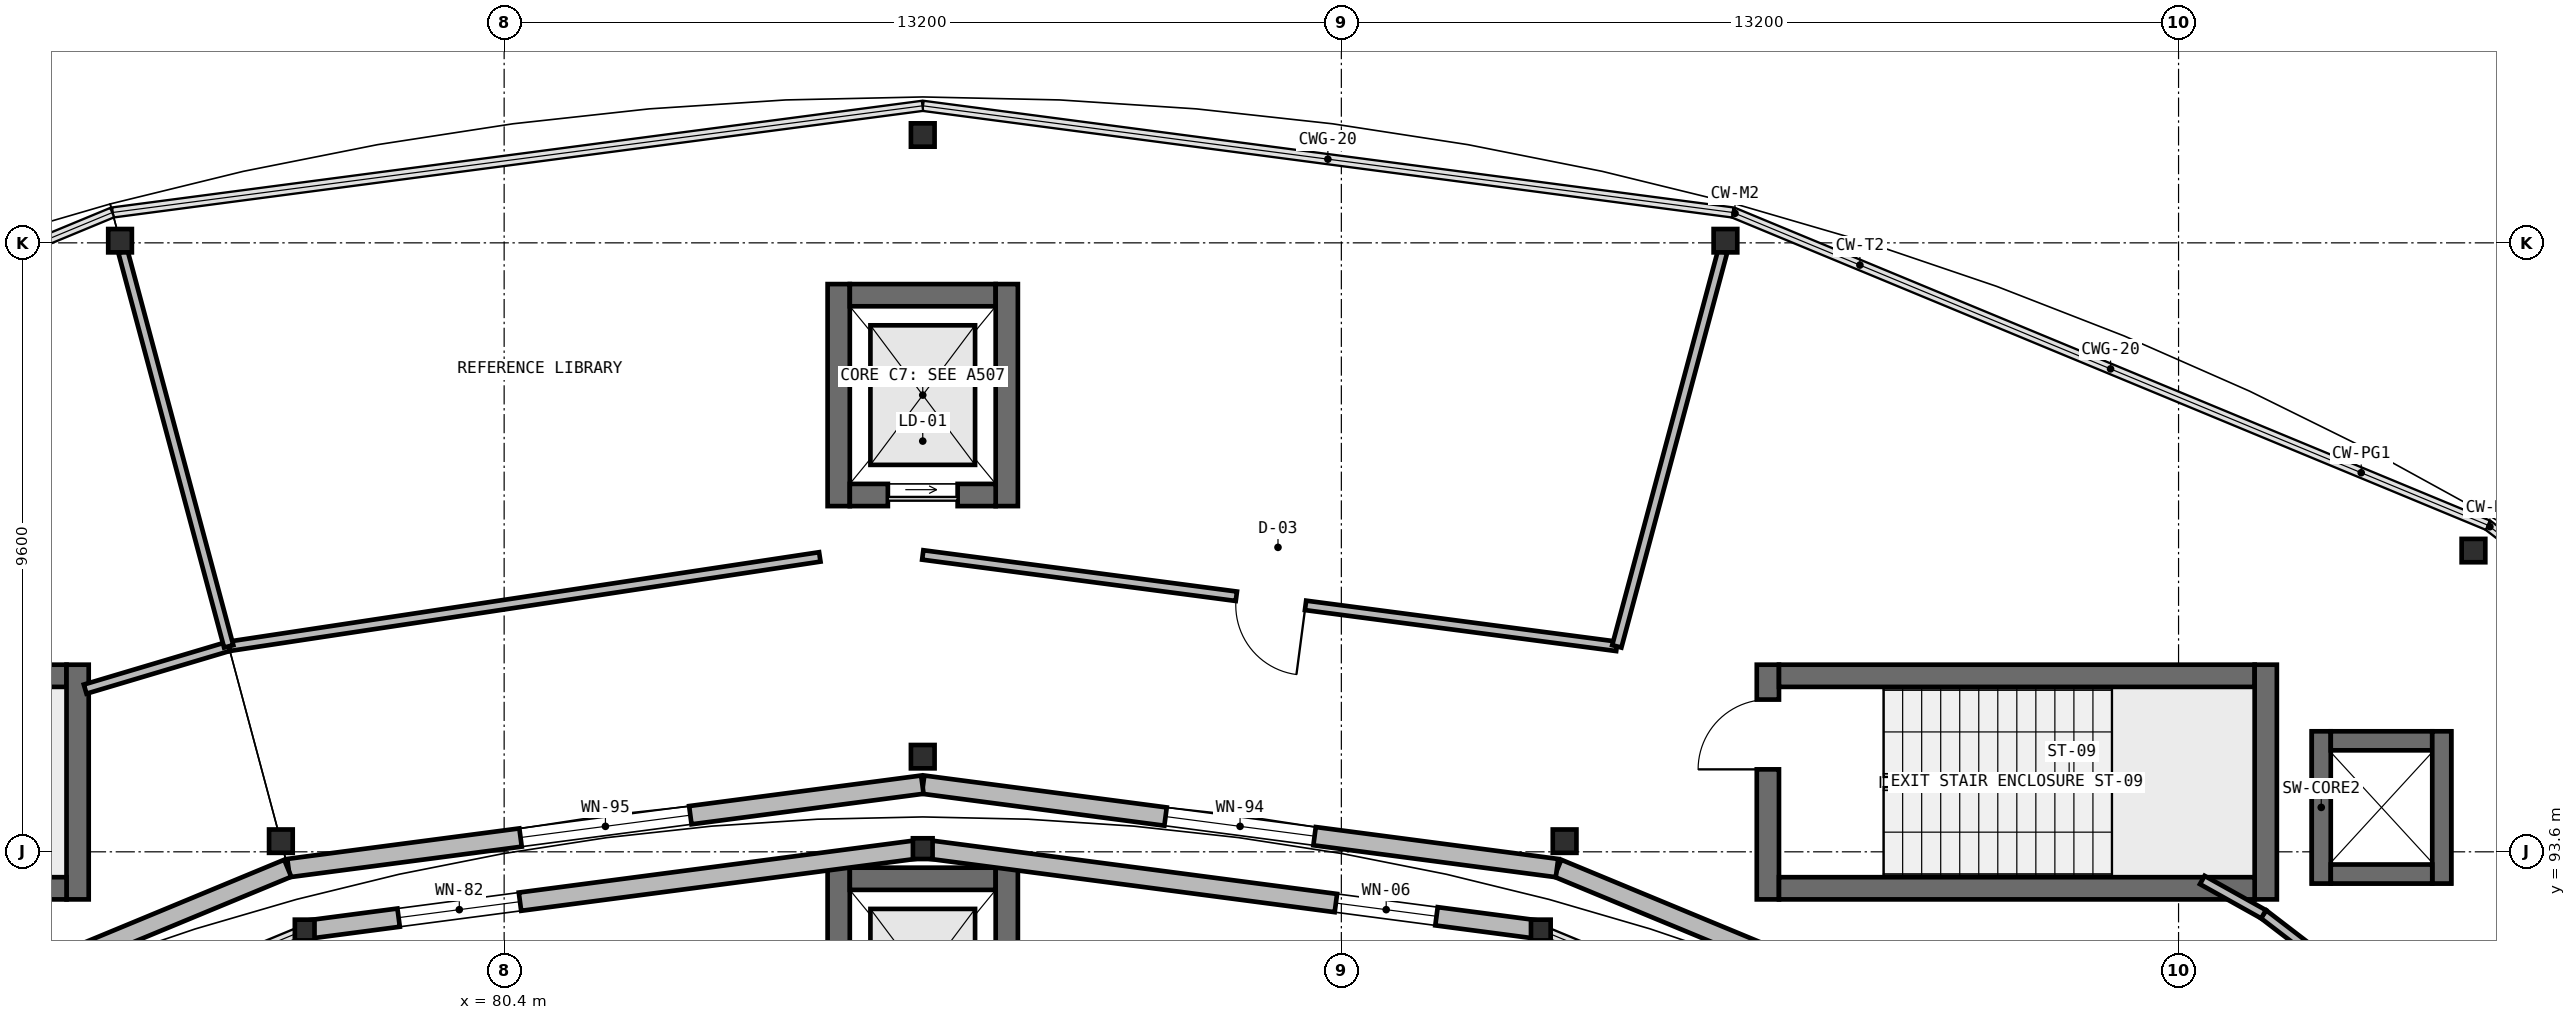
"""IFC4 building model, lengths in metres.
Left out: names, types, materials, properties, quantities, classifications, styles, units other than length and angle.
Written with IfcOpenShell. Run it as: python <this file> out.ifc"""

import sys

from ifc_helpers import new_model, si_unit, direction, frame, frame_2d, origin, origin_2d, place, context, subcontext, project, spatial, rectangle, i_section, extrude, element, fill, save


model = new_model("IFC4")
c1 = context("Model", 3, precision=1e-05, world=origin(), true_north=direction((0.0, 1.0)))
c2 = subcontext(c1, "Body", "Model", "MODEL_VIEW")
j1 = project(units=[si_unit("LENGTHUNIT", "METRE"), si_unit("PLANEANGLEUNIT", "RADIAN")], contexts=[c1])
p1 = place(None, origin())
s1 = spatial("IfcSite", under=j1, at=p1, CompositionType="ELEMENT")
p2 = place(p1, origin())
s2 = spatial("IfcBuilding", under=s1, at=p2, CompositionType="ELEMENT")
p3 = place(p2, frame((0.0, 0.0, 5.25)))
s3 = spatial("IfcBuildingStorey", under=s2, at=p3, CompositionType="ELEMENT", Elevation=5.25)
p4 = place(p3, frame((100.325, 92.85, 0.0), z_axis=(0.0, 0.0, 1.0), x_axis=(0.0, 1.0, 0.0)))
e1 = element("IfcWall", 1, at=p4, inside=s3, PredefinedType="SHEAR", context=c2, shape_type="SweptSolid", body=[
    extrude(rectangle(XDim=3.7, YDim=0.35, at=frame_2d((1.85, 0.0))), origin(), (0.0, 0.0, 1.0), 4.55),
])
p5 = place(p4, frame((2.05, 0.0, 0.0)))
e2 = element("IfcOpeningElement", 2, at=p5, cuts=e1, PredefinedType="OPENING", context=c2, shape_type="SweptSolid", body=[
    extrude(rectangle(XDim=1.1, YDim=2.15, at=frame_2d((0.55, 1.075))), frame((0.0, 0.185, 0.0), z_axis=(0.0, -1.0, 0.0), x_axis=(1.0, 0.0, 0.0)), (0.0, 0.0, 1.0), 0.37),
])
p6 = place(p3, frame((100.5, 96.375, 0.0), z_axis=(0.0, 0.0, 1.0), x_axis=(1.0, 0.0, 0.0)))
e3 = element("IfcWall", 3, at=p6, inside=s3, PredefinedType="SHEAR", context=c2, shape_type="SweptSolid", body=[
    extrude(rectangle(XDim=7.5, YDim=0.35, at=frame_2d((3.75, 0.0))), origin(), (0.0, 0.0, 1.0), 4.55),
])
p7 = place(p3, frame((108.175, 96.55, 0.0), z_axis=(0.0, 0.0, 1.0), x_axis=(0.0, -1.0, 0.0)))
e4 = element("IfcWall", 4, at=p7, inside=s3, PredefinedType="SHEAR", context=c2, shape_type="SweptSolid", body=[
    extrude(rectangle(XDim=3.7, YDim=0.35, at=frame_2d((1.85, 0.0))), origin(), (0.0, 0.0, 1.0), 4.55),
])
for number, where, z_axis, x_axis in (
    (5, (108.0, 93.025, 0.0), (0.0, 0.0, 1.0), (-1.0, 0.0, 0.0)),
    (6, (66.0, 96.375, 0.0), (0.0, 0.0, 1.0), (1.0, 0.0, 0.0)),
):
    element("IfcWall", number, at=place(p3, frame(where, z_axis=z_axis, x_axis=x_axis)), inside=s3, PredefinedType="SHEAR", context=c2, shape_type="SweptSolid", body=[
        extrude(rectangle(XDim=7.5, YDim=0.35, at=frame_2d((3.75, 0.0))), origin(), (0.0, 0.0, 1.0), 4.55),
    ])
p8 = place(p3, frame((73.675, 96.55, 0.0), z_axis=(0.0, 0.0, 1.0), x_axis=(0.0, -1.0, 0.0)))
e7 = element("IfcWall", 7, at=p8, inside=s3, PredefinedType="SHEAR", context=c2, shape_type="SweptSolid", body=[
    extrude(rectangle(XDim=3.7, YDim=0.35, at=frame_2d((1.85, 0.0))), origin(), (0.0, 0.0, 1.0), 4.55),
])
p9 = place(p3, frame((73.5, 93.025, 0.0), z_axis=(0.0, 0.0, 1.0), x_axis=(-1.0, 0.0, 0.0)))
e8 = element("IfcWall", 8, at=p9, inside=s3, PredefinedType="SHEAR", context=c2, shape_type="SweptSolid", body=[
    extrude(rectangle(XDim=7.5, YDim=0.35, at=frame_2d((3.75, 0.0))), origin(), (0.0, 0.0, 1.0), 4.55),
])
p10 = place(p9, frame((6.1, 0.0, 0.0)))
e9 = element("IfcOpeningElement", 9, at=p10, cuts=e8, PredefinedType="OPENING", context=c2, shape_type="SweptSolid", body=[
    extrude(rectangle(XDim=1.1, YDim=2.15, at=frame_2d((0.55, 1.075))), frame((0.0, 0.185, 0.0), z_axis=(0.0, -1.0, 0.0), x_axis=(1.0, 0.0, 0.0)), (0.0, 0.0, 1.0), 0.37),
])
p11 = place(p3, frame((85.675, 89.85, 0.0), z_axis=(0.0, 0.0, 1.0), x_axis=(0.0, 1.0, 0.0)))
e10 = element("IfcWall", 10, at=p11, inside=s3, PredefinedType="SHEAR", context=c2, shape_type="SweptSolid", body=[
    extrude(rectangle(XDim=3.5, YDim=0.35, at=frame_2d((1.75, 0.0))), origin(), (0.0, 0.0, 1.0), 4.55),
])
p12 = place(p3, frame((85.85, 93.175, 0.0), z_axis=(0.0, 0.0, 1.0), x_axis=(1.0, 0.0, 0.0)))
e11 = element("IfcWall", 11, at=p12, inside=s3, PredefinedType="SHEAR", context=c2, shape_type="SweptSolid", body=[
    extrude(rectangle(XDim=2.3, YDim=0.35, at=frame_2d((1.15, 0.0))), origin(), (0.0, 0.0, 1.0), 4.55),
])
for number, where, z_axis, x_axis in (
    (12, (88.325, 93.35, 0.0), (0.0, 0.0, 1.0), (0.0, -1.0, 0.0)),
    (13, (85.675, 99.05, 0.0), (0.0, 0.0, 1.0), (0.0, 1.0, 0.0)),
):
    element("IfcWall", number, at=place(p3, frame(where, z_axis=z_axis, x_axis=x_axis)), inside=s3, PredefinedType="SHEAR", context=c2, shape_type="SweptSolid", body=[
        extrude(rectangle(XDim=3.5, YDim=0.35, at=frame_2d((1.75, 0.0))), origin(), (0.0, 0.0, 1.0), 4.55),
    ])
p13 = place(p3, frame((85.85, 102.375, 0.0), z_axis=(0.0, 0.0, 1.0), x_axis=(1.0, 0.0, 0.0)))
e14 = element("IfcWall", 14, at=p13, inside=s3, PredefinedType="SHEAR", context=c2, shape_type="SweptSolid", body=[
    extrude(rectangle(XDim=2.3, YDim=0.35, at=frame_2d((1.15, 0.0))), origin(), (0.0, 0.0, 1.0), 4.55),
])
p14 = place(p3, frame((88.325, 102.55, 0.0), z_axis=(0.0, 0.0, 1.0), x_axis=(0.0, -1.0, 0.0)))
e15 = element("IfcWall", 15, at=p14, inside=s3, PredefinedType="SHEAR", context=c2, shape_type="SweptSolid", body=[
    extrude(rectangle(XDim=3.5, YDim=0.35, at=frame_2d((1.75, 0.0))), origin(), (0.0, 0.0, 1.0), 4.55),
])
p15 = place(p3, frame((88.15, 99.225, 0.0), z_axis=(0.0, 0.0, 1.0), x_axis=(-1.0, 0.0, 0.0)))
e16 = element("IfcWall", 16, at=p15, inside=s3, PredefinedType="SHEAR", context=c2, shape_type="SweptSolid", body=[
    extrude(rectangle(XDim=2.3, YDim=0.35, at=frame_2d((1.15, 0.0))), origin(), (0.0, 0.0, 1.0), 4.55),
])
p16 = place(p15, frame((0.6, 0.0, 0.0)))
e17 = element("IfcOpeningElement", 17, at=p16, cuts=e16, PredefinedType="OPENING", context=c2, shape_type="SweptSolid", body=[
    extrude(rectangle(XDim=1.1, YDim=2.15, at=frame_2d((0.55, 1.075))), frame((0.0, 0.185, 0.0), z_axis=(0.0, -1.0, 0.0), x_axis=(1.0, 0.0, 0.0)), (0.0, 0.0, 1.0), 0.37),
])
for number, where, z_axis, x_axis in (
    (18, (111.45, 98.349, 0.0), (0.0, 0.0, 1.0), (1.0, 0.0, 0.0)),
    (19, (97.12, 93.768, 0.0), (0.0, 0.0, 1.0), (1.0, 0.0, 0.0)),
    (20, (99.656, 103.234, 0.0), (0.0, 0.0, 1.0), (1.0, 0.0, 0.0)),
    (21, (87.0, 95.1, 0.0), (0.0, 0.0, 1.0), (1.0, 0.0, 0.0)),
    (22, (87.0, 104.9, 0.0), (0.0, 0.0, 1.0), (1.0, 0.0, 0.0)),
    (23, (76.88, 93.768, 0.0), (0.0, 0.0, 1.0), (1.0, 0.0, 0.0)),
    (24, (74.344, 103.234, 0.0), (0.0, 0.0, 1.0), (1.0, 0.0, 0.0)),
):
    element("IfcColumn", number, at=place(p3, frame(where, z_axis=z_axis, x_axis=x_axis)), inside=s3, PredefinedType="COLUMN", context=c2, shape_type="SweptSolid", body=[
        extrude(i_section(OverallWidth=0.373, OverallDepth=0.368, WebThickness=0.017, FlangeThickness=0.027, at=origin_2d()), origin(), (0.0, 0.0, 1.0), 4.55),
    ])
for number, where, z_axis, x_axis in (
    (25, (96.745, 92.367, 0.0), (0.0, 0.0, 1.0), (1.0, 0.0, 0.0)),
    (26, (87.0, 93.65, 0.0), (0.0, 0.0, 1.0), (1.0, 0.0, 0.0)),
    (27, (77.255, 92.367, 0.0), (0.0, 0.0, 1.0), (1.0, 0.0, 0.0)),
):
    element("IfcColumn", number, at=place(p3, frame(where, z_axis=z_axis, x_axis=x_axis)), inside=s3, PredefinedType="COLUMN", context=c2, shape_type="SweptSolid", body=[
        extrude(i_section(OverallWidth=0.31, OverallDepth=0.327, WebThickness=0.016, FlangeThickness=0.025, at=origin_2d()), origin(), (0.0, 0.0, 1.0), 4.55),
    ])
p17 = place(p3, frame((109.05, 93.1, 0.0), z_axis=(0.0, 0.0, 1.0), x_axis=(0.0, 1.0, 0.0)))
e28 = element("IfcWall", 28, at=p17, inside=s3, PredefinedType="SHEAR", context=c2, shape_type="SweptSolid", body=[
    extrude(rectangle(XDim=2.4, YDim=0.3, at=frame_2d((1.2, 0.0))), origin(), (0.0, 0.0, 1.0), 4.37),
])
p18 = place(p3, frame((109.2, 95.35, 0.0), z_axis=(0.0, 0.0, 1.0), x_axis=(1.0, 0.0, 0.0)))
e29 = element("IfcWall", 29, at=p18, inside=s3, PredefinedType="SHEAR", context=c2, shape_type="SweptSolid", body=[
    extrude(rectangle(XDim=1.6, YDim=0.3, at=frame_2d((0.8, 0.0))), origin(), (0.0, 0.0, 1.0), 4.37),
])
p19 = place(p3, frame((110.95, 95.5, 0.0), z_axis=(0.0, 0.0, 1.0), x_axis=(0.0, -1.0, 0.0)))
e30 = element("IfcWall", 30, at=p19, inside=s3, PredefinedType="SHEAR", context=c2, shape_type="SweptSolid", body=[
    extrude(rectangle(XDim=2.4, YDim=0.3, at=frame_2d((1.2, 0.0))), origin(), (0.0, 0.0, 1.0), 4.37),
])
p20 = place(p3, frame((110.8, 93.25, 0.0), z_axis=(0.0, 0.0, 1.0), x_axis=(-1.0, 0.0, 0.0)))
e31 = element("IfcWall", 31, at=p20, inside=s3, PredefinedType="SHEAR", context=c2, shape_type="SweptSolid", body=[
    extrude(rectangle(XDim=1.6, YDim=0.3, at=frame_2d((0.8, 0.0))), origin(), (0.0, 0.0, 1.0), 4.37),
])
p21 = place(p3, frame((106.325, 89.483, 0.0), z_axis=(0.0, 0.0, 1.0), x_axis=(-0.92385889973, 0.382733240508, 0.0)))
e32 = element("IfcWall", 32, at=p21, inside=s3, PredefinedType="SOLIDWALL", context=c2, shape_type="SweptSolid", body=[
    extrude(rectangle(XDim=10.081, YDim=0.29, at=frame_2d((5.04, 0.0))), origin(), (0.0, 0.0, 1.0), 4.37),
])
p22 = place(p21, frame((4.02, 0.0, 0.95)))
e33 = element("IfcOpeningElement", 33, at=p22, cuts=e32, PredefinedType="OPENING", context=c2, shape_type="SweptSolid", body=[
    extrude(rectangle(XDim=2.04, YDim=1.67, at=frame_2d((1.02, 0.835))), frame((0.0, 0.155, 0.0), z_axis=(0.0, -1.0, 0.0), x_axis=(1.0, 0.0, 0.0)), (0.0, 0.0, 1.0), 0.31),
])
p23 = place(p3, frame((97.0, 93.344, 0.0), z_axis=(0.0, 0.0, 1.0), x_axis=(-0.991454872597, 0.130450126879, 0.0)))
e34 = element("IfcWall", 34, at=p23, inside=s3, PredefinedType="SOLIDWALL", context=c2, shape_type="SweptSolid", body=[
    extrude(rectangle(XDim=10.08, YDim=0.29, at=frame_2d((5.04, 0.0))), origin(), (0.0, 0.0, 1.0), 3.732),
])
p24 = place(p23, frame((3.855, 0.0, 0.95)))
e35 = element("IfcOpeningElement", 35, at=p24, cuts=e34, PredefinedType="OPENING", context=c2, shape_type="SweptSolid", body=[
    extrude(rectangle(XDim=2.37, YDim=1.59, at=frame_2d((1.185, 0.795))), frame((0.0, 0.155, 0.0), z_axis=(0.0, -1.0, 0.0), x_axis=(1.0, 0.0, 0.0)), (0.0, 0.0, 1.0), 0.31),
])
p25 = place(p3, frame((86.994, 94.659, 0.0), z_axis=(0.0, 0.0, 1.0), x_axis=(-0.991454872597, -0.130450126879, 0.0)))
e36 = element("IfcWall", 36, at=p25, inside=s3, PredefinedType="SOLIDWALL", context=c2, shape_type="SweptSolid", body=[
    extrude(rectangle(XDim=10.08, YDim=0.29, at=frame_2d((5.04, 0.0))), origin(), (0.0, 0.0, 1.0), 3.732),
])
p26 = place(p25, frame((3.69, 0.0, 0.95)))
e37 = element("IfcOpeningElement", 37, at=p26, cuts=e36, PredefinedType="OPENING", context=c2, shape_type="SweptSolid", body=[
    extrude(rectangle(XDim=2.7, YDim=1.51, at=frame_2d((1.35, 0.755))), frame((0.0, 0.155, 0.0), z_axis=(0.0, -1.0, 0.0), x_axis=(1.0, 0.0, 0.0)), (0.0, 0.0, 1.0), 0.31),
])
p27 = place(p3, frame((76.988, 93.341, 0.0), z_axis=(0.0, 0.0, 1.0), x_axis=(-0.92385889973, -0.382733240508, 0.0)))
e38 = element("IfcWall", 38, at=p27, inside=s3, PredefinedType="SOLIDWALL", context=c2, shape_type="SweptSolid", body=[
    extrude(rectangle(XDim=10.081, YDim=0.29, at=frame_2d((5.04, 0.0))), origin(), (0.0, 0.0, 1.0), 4.37),
])
p28 = place(p27, frame((4.405, 0.0, 0.95)))
e39 = element("IfcOpeningElement", 39, at=p28, cuts=e38, PredefinedType="OPENING", context=c2, shape_type="SweptSolid", body=[
    extrude(rectangle(XDim=1.27, YDim=1.43, at=frame_2d((0.635, 0.715))), frame((0.0, 0.155, 0.0), z_axis=(0.0, -1.0, 0.0), x_axis=(1.0, 0.0, 0.0)), (0.0, 0.0, 1.0), 0.31),
])
p29 = place(p3, frame((87.004, 93.649, 0.0), z_axis=(0.0, 0.0, 1.0), x_axis=(0.991456749128, -0.130435863969, 0.0)))
e40 = element("IfcWall", 40, at=p29, inside=s3, PredefinedType="SOLIDWALL", context=c2, shape_type="SweptSolid", body=[
    extrude(rectangle(XDim=9.821, YDim=0.29, at=frame_2d((4.911, 0.0))), origin(), (0.0, 0.0, 1.0), 3.815),
])
p30 = place(p29, frame((6.566, 0.0, 0.95)))
e41 = element("IfcOpeningElement", 41, at=p30, cuts=e40, PredefinedType="OPENING", context=c2, shape_type="SweptSolid", body=[
    extrude(rectangle(XDim=1.6, YDim=1.4, at=frame_2d((0.8, 0.7))), frame((0.0, 0.155, 0.0), z_axis=(0.0, -1.0, 0.0), x_axis=(1.0, 0.0, 0.0)), (0.0, 0.0, 1.0), 0.31),
])
p31 = place(p3, frame((77.259, 92.368, 0.0), z_axis=(0.0, 0.0, 1.0), x_axis=(0.991456749128, 0.130435863969, 0.0)))
e42 = element("IfcWall", 42, at=p31, inside=s3, PredefinedType="SOLIDWALL", context=c2, shape_type="SweptSolid", body=[
    extrude(rectangle(XDim=9.821, YDim=0.29, at=frame_2d((4.911, 0.0))), origin(), (0.0, 0.0, 1.0), 3.815),
])
p32 = place(p31, frame((1.49, 0.0, 0.95)))
e43 = element("IfcOpeningElement", 43, at=p32, cuts=e42, PredefinedType="OPENING", context=c2, shape_type="SweptSolid", body=[
    extrude(rectangle(XDim=1.93, YDim=1.8, at=frame_2d((0.965, 0.9))), frame((0.0, 0.155, 0.0), z_axis=(0.0, -1.0, 0.0), x_axis=(1.0, 0.0, 0.0)), (0.0, 0.0, 1.0), 0.31),
])
p33 = place(p3, frame((116.896, 85.896, 0.0), z_axis=(0.0, 0.0, 1.0), x_axis=(-0.793301872689, 0.608828497024, 0.0)))
e44 = element("IfcWall", 44, at=p33, inside=s3, PredefinedType="PARTITIONING", context=c2, shape_type="SweptSolid", body=[
    extrude(rectangle(XDim=11.038, YDim=0.15, at=frame_2d((5.519, 0.0))), origin(), (0.0, 0.0, 1.0), 3.737),
])
p34 = place(p33, frame((4.95, 0.0, 0.0)))
e45 = element("IfcOpeningElement", 45, at=p34, cuts=e44, PredefinedType="OPENING", context=c2, shape_type="SweptSolid", body=[
    extrude(rectangle(XDim=1.1, YDim=2.2, at=frame_2d((0.55, 1.1))), frame((0.0, 0.085, 0.0), z_axis=(0.0, -1.0, 0.0), x_axis=(1.0, 0.0, 0.0)), (0.0, 0.0, 1.0), 0.17),
])
p35 = place(p3, frame((108.14, 92.616, 0.0), z_axis=(0.0, 0.0, 1.0), x_axis=(-0.872821867213, 0.488038920697, 0.0)))
e46 = element("IfcWall", 46, at=p35, inside=s3, PredefinedType="PARTITIONING", context=c2, shape_type="SweptSolid", body=[
    extrude(rectangle(XDim=1.106, YDim=0.15, at=frame_2d((0.553, 0.0))), origin(), (0.0, 0.0, 1.0), 4.23),
])
p36 = place(p3, frame((97.943, 96.839, 0.0), z_axis=(0.0, 0.0, 1.0), x_axis=(-0.991442170204, 0.130546632054, 0.0)))
e47 = element("IfcWall", 47, at=p36, inside=s3, PredefinedType="PARTITIONING", context=c2, shape_type="SweptSolid", body=[
    extrude(rectangle(XDim=11.038, YDim=0.15, at=frame_2d((5.519, 0.0))), origin(), (0.0, 0.0, 1.0), 3.737),
])
p37 = place(p36, frame((4.95, 0.0, 0.0)))
e48 = element("IfcOpeningElement", 48, at=p37, cuts=e47, PredefinedType="OPENING", context=c2, shape_type="SweptSolid", body=[
    extrude(rectangle(XDim=1.1, YDim=2.2, at=frame_2d((0.55, 1.1))), frame((0.0, 0.085, 0.0), z_axis=(0.0, -1.0, 0.0), x_axis=(1.0, 0.0, 0.0)), (0.0, 0.0, 1.0), 0.17),
])
p38 = place(p3, frame((85.377, 98.249, 0.0), z_axis=(0.0, 0.0, 1.0), x_axis=(-0.988750352389, -0.149575200656, 0.0)))
e49 = element("IfcWall", 49, at=p38, inside=s3, PredefinedType="PARTITIONING", context=c2, shape_type="SweptSolid", body=[
    extrude(rectangle(XDim=9.426, YDim=0.15, at=frame_2d((4.713, 0.0))), origin(), (0.0, 0.0, 1.0), 3.737),
])
p39 = place(p3, frame((76.057, 96.839, 0.0), z_axis=(0.0, 0.0, 1.0), x_axis=(-0.95838508169, -0.285478607244, 0.0)))
e50 = element("IfcWall", 50, at=p39, inside=s3, PredefinedType="PARTITIONING", context=c2, shape_type="SweptSolid", body=[
    extrude(rectangle(XDim=2.361, YDim=0.15, at=frame_2d((1.181, 0.0))), origin(), (0.0, 0.0, 1.0), 3.737),
])
for number, where, z_axis, x_axis in (
    (51, (97.943, 96.839, 0.0), (0.0, 0.0, 1.0), (0.259, 0.966, 0.0)),
    (52, (76.057, 96.839, 0.0), (0.0, 0.0, 1.0), (-0.259, 0.966, 0.0)),
):
    element("IfcWall", number, at=place(p3, frame(where, z_axis=z_axis, x_axis=x_axis)), inside=s3, PredefinedType="PARTITIONING", context=c2, shape_type="SweptSolid", body=[
        extrude(rectangle(XDim=6.44, YDim=0.15, at=frame_2d((3.22, 0.0))), origin(), (0.0, 0.0, 1.0), 3.737),
    ])
p40 = place(p24, origin())
e53 = element("IfcWindow", 53, at=p40, inside=s3, PartitioningType="SINGLE_PANEL", PredefinedType="WINDOW", context=c2, shape_type="SweptSolid", body=[
    extrude(rectangle(XDim=2.37, YDim=1.59, at=frame_2d((1.185, 0.795))), frame((0.0, 0.03, 0.0), z_axis=(0.0, -1.0, 0.0), x_axis=(1.0, 0.0, 0.0)), (0.0, 0.0, 1.0), 0.06),
])
fill(e35, e53)
p41 = place(p26, origin())
e54 = element("IfcWindow", 54, at=p41, inside=s3, PartitioningType="SINGLE_PANEL", PredefinedType="WINDOW", context=c2, shape_type="SweptSolid", body=[
    extrude(rectangle(XDim=2.7, YDim=1.51, at=frame_2d((1.35, 0.755))), frame((0.0, 0.03, 0.0), z_axis=(0.0, -1.0, 0.0), x_axis=(1.0, 0.0, 0.0)), (0.0, 0.0, 1.0), 0.06),
])
fill(e37, e54)
p42 = place(p30, origin())
e55 = element("IfcWindow", 55, at=p42, inside=s3, PartitioningType="SINGLE_PANEL", PredefinedType="WINDOW", context=c2, shape_type="SweptSolid", body=[
    extrude(rectangle(XDim=1.6, YDim=1.4, at=frame_2d((0.8, 0.7))), frame((0.0, 0.03, 0.0), z_axis=(0.0, -1.0, 0.0), x_axis=(1.0, 0.0, 0.0)), (0.0, 0.0, 1.0), 0.06),
])
fill(e41, e55)
p43 = place(p32, origin())
e56 = element("IfcWindow", 56, at=p43, inside=s3, PartitioningType="SINGLE_PANEL", PredefinedType="WINDOW", context=c2, shape_type="SweptSolid", body=[
    extrude(rectangle(XDim=1.93, YDim=1.8, at=frame_2d((0.965, 0.9))), frame((0.0, 0.03, 0.0), z_axis=(0.0, -1.0, 0.0), x_axis=(1.0, 0.0, 0.0)), (0.0, 0.0, 1.0), 0.06),
])
fill(e43, e56)
p44 = place(p5, origin())
e57 = element("IfcDoor", 57, at=p44, inside=s3, OperationType="SINGLE_SWING_LEFT", PredefinedType="DOOR", context=c2, shape_type="SweptSolid", body=[
    extrude(rectangle(XDim=1.1, YDim=2.15, at=frame_2d((0.55, 1.075))), frame((0.0, 0.025, 0.0), z_axis=(0.0, -1.0, 0.0), x_axis=(1.0, 0.0, 0.0)), (0.0, 0.0, 1.0), 0.05),
])
fill(e2, e57)
p45 = place(p16, origin())
e58 = element("IfcDoor", 58, at=p45, inside=s3, OperationType="SLIDING_TO_LEFT", PredefinedType="USERDEFINED", context=c2, shape_type="SweptSolid", body=[
    extrude(rectangle(XDim=1.1, YDim=2.15, at=frame_2d((0.55, 1.075))), frame((0.0, 0.025, 0.0), z_axis=(0.0, -1.0, 0.0), x_axis=(1.0, 0.0, 0.0)), (0.0, 0.0, 1.0), 0.05),
])
fill(e17, e58)
p46 = place(p37, origin())
e59 = element("IfcDoor", 59, at=p46, inside=s3, OperationType="SINGLE_SWING_LEFT", PredefinedType="DOOR", context=c2, shape_type="SweptSolid", body=[
    extrude(rectangle(XDim=1.1, YDim=2.2, at=frame_2d((0.55, 1.1))), frame((0.0, 0.025, 0.0), z_axis=(0.0, -1.0, 0.0), x_axis=(1.0, 0.0, 0.0)), (0.0, 0.0, 1.0), 0.05),
])
fill(e48, e59)
save(model, sys.argv[1])
